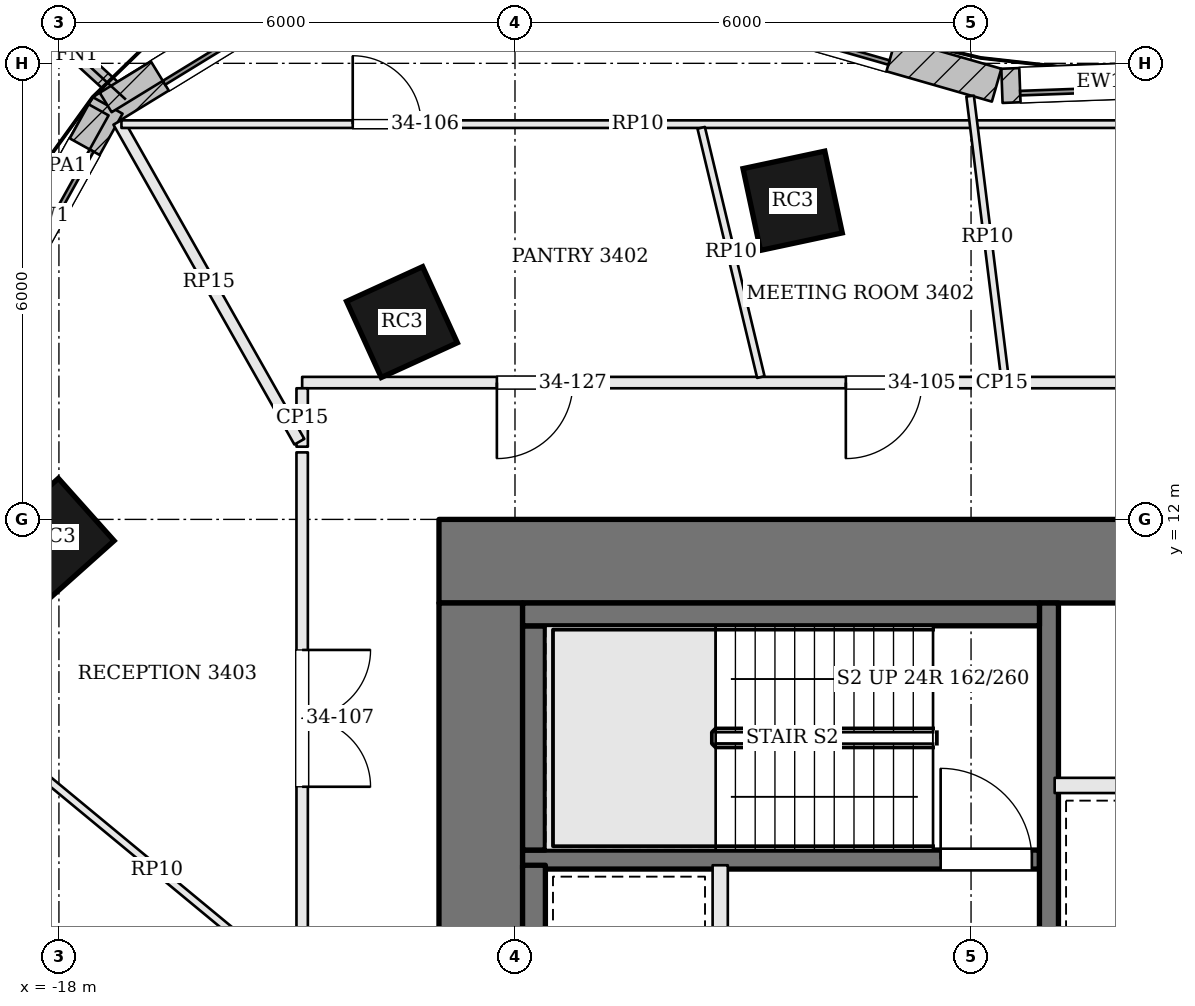
"""IFC4 building model, lengths in metres.
Left out: names, types, materials, properties, quantities, classifications, styles, units other than length and angle.
Written with IfcOpenShell. Run it as: python <this file> out.ifc"""

import sys

from ifc_helpers import new_model, si_unit, direction, frame, frame_2d, origin, origin_2d, place, context, subcontext, project, spatial, rectangle, extrude, element, fill, save


model = new_model("IFC4")
c1 = context("Model", 3, precision=1e-05, world=origin(), true_north=direction((0.0, 1.0)))
c2 = subcontext(c1, "Body", "Model", "MODEL_VIEW")
j1 = project(units=[si_unit("LENGTHUNIT", "METRE"), si_unit("PLANEANGLEUNIT", "RADIAN")], contexts=[c1])
p1 = place(None, origin())
s1 = spatial("IfcSite", under=j1, at=p1, CompositionType="ELEMENT")
p2 = place(p1, origin())
s2 = spatial("IfcBuilding", under=s1, at=p2, CompositionType="ELEMENT")
p3 = place(p2, frame((0.0, 0.0, 142.2)))
s3 = spatial("IfcBuildingStorey", under=s2, at=p3, CompositionType="ELEMENT", Elevation=142.2)
p4 = place(p3, frame((-13.0, 11.45, 0.0), z_axis=(0.0, 0.0, 1.0), x_axis=(1.0, 0.0, 0.0)))
e1 = element("IfcWall", 1, at=p4, inside=s3, PredefinedType="SHEAR", context=c2, shape_type="SweptSolid", body=[
    extrude(rectangle(XDim=26.0, YDim=1.1, at=frame_2d((13.0, 0.0))), origin(), (0.0, 0.0, 1.0), 3.9),
])
p5 = place(p4, frame((8.975, 0.0, 0.0)))
e2 = element("IfcOpeningElement", 2, at=p5, cuts=e1, PredefinedType="OPENING", context=c2, shape_type="SweptSolid", body=[
    extrude(rectangle(XDim=0.7, YDim=2.1, at=frame_2d((0.35, 1.05))), frame((0.0, 0.56, 0.0), z_axis=(0.0, -1.0, 0.0), x_axis=(1.0, 0.0, 0.0)), (0.0, 0.0, 1.0), 1.12),
])
p6 = place(p4, frame((11.425, 0.0, 0.0)))
e3 = element("IfcOpeningElement", 3, at=p6, cuts=e1, PredefinedType="OPENING", context=c2, shape_type="SweptSolid", body=[
    extrude(rectangle(XDim=0.7, YDim=2.1, at=frame_2d((0.35, 1.05))), frame((0.0, 0.56, 0.0), z_axis=(0.0, -1.0, 0.0), x_axis=(1.0, 0.0, 0.0)), (0.0, 0.0, 1.0), 1.12),
])
p7 = place(p4, frame((13.725, 0.0, 0.0)))
e4 = element("IfcOpeningElement", 4, at=p7, cuts=e1, PredefinedType="OPENING", context=c2, shape_type="SweptSolid", body=[
    extrude(rectangle(XDim=1.0, YDim=2.1, at=frame_2d((0.5, 1.05))), frame((0.0, 0.56, 0.0), z_axis=(0.0, -1.0, 0.0), x_axis=(1.0, 0.0, 0.0)), (0.0, 0.0, 1.0), 1.12),
])
p8 = place(p4, frame((16.175, 0.0, 0.0)))
e5 = element("IfcOpeningElement", 5, at=p8, cuts=e1, PredefinedType="OPENING", context=c2, shape_type="SweptSolid", body=[
    extrude(rectangle(XDim=1.0, YDim=2.1, at=frame_2d((0.5, 1.05))), frame((0.0, 0.56, 0.0), z_axis=(0.0, -1.0, 0.0), x_axis=(1.0, 0.0, 0.0)), (0.0, 0.0, 1.0), 1.12),
])
p9 = place(p3, frame((-12.45, -1.9, 0.0), z_axis=(0.0, 0.0, 1.0), x_axis=(0.0, 1.0, 0.0)))
e6 = element("IfcWall", 6, at=p9, inside=s3, PredefinedType="SHEAR", context=c2, shape_type="SweptSolid", body=[
    extrude(rectangle(XDim=12.8, YDim=1.1, at=frame_2d((6.4, 0.0))), origin(), (0.0, 0.0, 1.0), 3.9),
])
p10 = place(p9, frame((3.9, 0.0, 0.0)))
e7 = element("IfcOpeningElement", 7, at=p10, cuts=e6, PredefinedType="OPENING", context=c2, shape_type="SweptSolid", body=[
    extrude(rectangle(XDim=1.8, YDim=2.1, at=frame_2d((0.9, 1.05))), frame((0.0, 0.56, 0.0), z_axis=(0.0, -1.0, 0.0), x_axis=(1.0, 0.0, 0.0)), (0.0, 0.0, 1.0), 1.12),
])
for number, where, z_axis, x_axis in (
    (8, (-8.347, 16.192, 0.0), (0.0, 0.0, 1.0), (-0.978, -0.209, 0.0)),
    (9, (-13.487, 14.596, 0.0), (0.0, 0.0, 1.0), (-0.91, -0.415, 0.0)),
    (10, (-18.051, 11.763, 0.0), (0.0, 0.0, 1.0), (-0.746, -0.666, 0.0)),
):
    element("IfcColumn", number, at=place(p3, frame(where, z_axis=z_axis, x_axis=x_axis)), inside=s3, PredefinedType="COLUMN", context=c2, shape_type="SweptSolid", body=[
        extrude(rectangle(XDim=1.1, YDim=1.1, at=origin_2d()), origin(), (0.0, 0.0, 1.0), 3.9),
    ])
p11 = place(p3, frame((-3.022, 17.798, 0.0), z_axis=(0.0, 0.0, 1.0), x_axis=(-0.999339560591, -0.036337895349, 0.0)))
e11 = element("IfcWall", 11, at=p11, inside=s3, PredefinedType="SOLIDWALL", context=c2, shape_type="SweptSolid", body=[
    extrude(rectangle(XDim=2.573, YDim=0.45, at=frame_2d((1.287, 0.0))), origin(), (0.0, 0.0, 1.0), 3.7),
])
p12 = place(p11, frame((0.237, 0.0, 0.9)))
e12 = element("IfcOpeningElement", 12, at=p12, cuts=e11, PredefinedType="OPENING", context=c2, shape_type="SweptSolid", body=[
    extrude(rectangle(XDim=2.1, YDim=2.3, at=frame_2d((1.05, 1.15))), frame((0.0, 0.235, 0.0), z_axis=(0.0, -1.0, 0.0), x_axis=(1.0, 0.0, 0.0)), (0.0, 0.0, 1.0), 0.47),
])
p13 = place(p3, frame((-5.664, 17.713, 0.0), z_axis=(0.0, 0.0, 1.0), x_axis=(-0.961108031684, 0.276172684083, 0.0)))
e13 = element("IfcWall", 13, at=p13, inside=s3, PredefinedType="SOLIDWALL", context=c2, shape_type="SweptSolid", body=[
    extrude(rectangle(XDim=4.686, YDim=0.45, at=frame_2d((2.343, 0.0))), origin(), (0.0, 0.0, 1.0), 3.7),
])
p14 = place(p13, frame((1.443, 0.0, 0.9)))
e14 = element("IfcOpeningElement", 14, at=p14, cuts=e13, PredefinedType="OPENING", context=c2, shape_type="SweptSolid", body=[
    extrude(rectangle(XDim=1.8, YDim=2.3, at=frame_2d((0.9, 1.15))), frame((0.0, 0.235, 0.0), z_axis=(0.0, -1.0, 0.0), x_axis=(1.0, 0.0, 0.0)), (0.0, 0.0, 1.0), 0.47),
])
p15 = place(p3, frame((-14.116, 19.4, 0.0), z_axis=(0.0, 0.0, 1.0), x_axis=(-0.852622865325, -0.522526793117, 0.0)))
e15 = element("IfcWall", 15, at=p15, inside=s3, PredefinedType="SOLIDWALL", context=c2, shape_type="SweptSolid", body=[
    extrude(rectangle(XDim=3.896, YDim=0.45, at=frame_2d((1.948, 0.0))), origin(), (0.0, 0.0, 1.0), 3.7),
])
p16 = place(p15, frame((0.898, 0.0, 0.9)))
e16 = element("IfcOpeningElement", 16, at=p16, cuts=e15, PredefinedType="OPENING", context=c2, shape_type="SweptSolid", body=[
    extrude(rectangle(XDim=2.1, YDim=2.3, at=frame_2d((1.05, 1.15))), frame((0.0, 0.235, 0.0), z_axis=(0.0, -1.0, 0.0), x_axis=(1.0, 0.0, 0.0)), (0.0, 0.0, 1.0), 0.47),
])
p17 = place(p3, frame((-17.359, 17.447, 0.0), z_axis=(0.0, 0.0, 1.0), x_axis=(-0.485618126214, -0.874171056197, 0.0)))
e17 = element("IfcWall", 17, at=p17, inside=s3, PredefinedType="SOLIDWALL", context=c2, shape_type="SweptSolid", body=[
    extrude(rectangle(XDim=3.343, YDim=0.45, at=frame_2d((1.671, 0.0))), origin(), (0.0, 0.0, 1.0), 3.7),
])
p18 = place(p17, frame((0.621, 0.0, 0.9)))
e18 = element("IfcOpeningElement", 18, at=p18, cuts=e17, PredefinedType="OPENING", context=c2, shape_type="SweptSolid", body=[
    extrude(rectangle(XDim=2.1, YDim=2.3, at=frame_2d((1.05, 1.15))), frame((0.0, 0.235, 0.0), z_axis=(0.0, -1.0, 0.0), x_axis=(1.0, 0.0, 0.0)), (0.0, 0.0, 1.0), 0.47),
])
p19 = place(p3, frame((-17.119, 17.523, 0.0), z_axis=(0.0, 0.0, 1.0), x_axis=(-0.737866019047, 0.674947211221, 0.0)))
e19 = element("IfcWall", 19, at=p19, inside=s3, PredefinedType="SOLIDWALL", context=c2, shape_type="SweptSolid", body=[
    extrude(rectangle(XDim=1.75, YDim=0.2, at=frame_2d((0.875, 0.0))), origin(), (0.0, 0.0, 1.0), 3.7),
])
p20 = place(p3, frame((-14.266, 19.396, 3.9), z_axis=(0.0, 0.0, 1.0), x_axis=(-0.852626191256, -0.522521366055, 0.0)))
e20 = element("IfcWall", 20, at=p20, inside=s3, PredefinedType="PARAPET", context=c2, shape_type="SweptSolid", body=[
    extrude(rectangle(XDim=3.658, YDim=0.3, at=frame_2d((1.829, 0.0))), origin(), (0.0, 0.0, 1.0), 1.1),
])
p21 = place(p3, frame((-17.478, 17.388, 3.9), z_axis=(0.0, 0.0, 1.0), x_axis=(-0.485655243725, -0.874150435705, 0.0)))
e21 = element("IfcWall", 21, at=p21, inside=s3, PredefinedType="PARAPET", context=c2, shape_type="SweptSolid", body=[
    extrude(rectangle(XDim=1.684, YDim=0.3, at=frame_2d((0.842, 0.0))), origin(), (0.0, 0.0, 1.0), 1.1),
])
p22 = place(p3, frame((-11.9, 7.525, 0.0), z_axis=(0.0, 0.0, 1.0), x_axis=(1.0, 0.0, 0.0)))
e22 = element("IfcWall", 22, at=p22, inside=s3, PredefinedType="SOLIDWALL", context=c2, shape_type="SweptSolid", body=[
    extrude(rectangle(XDim=6.8, YDim=0.25, at=frame_2d((3.4, 0.0))), origin(), (0.0, 0.0, 1.0), 3.7),
])
p23 = place(p22, frame((5.5, 0.0, 0.0)))
e23 = element("IfcOpeningElement", 23, at=p23, cuts=e22, PredefinedType="OPENING", context=c2, shape_type="SweptSolid", body=[
    extrude(rectangle(XDim=1.2, YDim=2.1, at=frame_2d((0.6, 1.05))), frame((0.0, 0.135, 0.0), z_axis=(0.0, -1.0, 0.0), x_axis=(1.0, 0.0, 0.0)), (0.0, 0.0, 1.0), 0.27),
])
p24 = place(p3, frame((-9.3, 4.45, 0.0), z_axis=(0.0, 0.0, 1.0), x_axis=(0.0, 1.0, 0.0)))
e24 = element("IfcWall", 24, at=p24, inside=s3, PredefinedType="SOLIDWALL", context=c2, shape_type="SweptSolid", body=[
    extrude(rectangle(XDim=3.0, YDim=0.2, at=frame_2d((1.5, 0.0))), origin(), (0.0, 0.0, 1.0), 3.7),
])
p25 = place(p3, frame((-4.975, -1.9, 0.0), z_axis=(0.0, 0.0, 1.0), x_axis=(0.0, 1.0, 0.0)))
e25 = element("IfcWall", 25, at=p25, inside=s3, PredefinedType="SOLIDWALL", context=c2, shape_type="SweptSolid", body=[
    extrude(rectangle(XDim=12.8, YDim=0.25, at=frame_2d((6.4, 0.0))), origin(), (0.0, 0.0, 1.0), 3.7),
])
p26 = place(p25, frame((4.95, 0.0, 0.0)))
e26 = element("IfcOpeningElement", 26, at=p26, cuts=e25, PredefinedType="OPENING", context=c2, shape_type="SweptSolid", body=[
    extrude(rectangle(XDim=1.2, YDim=2.1, at=frame_2d((0.6, 1.05))), frame((0.0, 0.135, 0.0), z_axis=(0.0, -1.0, 0.0), x_axis=(1.0, 0.0, 0.0)), (0.0, 0.0, 1.0), 0.27),
])
p27 = place(p3, frame((-11.75, 4.45, 0.0), z_axis=(0.0, 0.0, 1.0), x_axis=(0.0, 1.0, 0.0)))
e27 = element("IfcWall", 27, at=p27, inside=s3, PredefinedType="SOLIDWALL", context=c2, shape_type="SweptSolid", body=[
    extrude(rectangle(XDim=3.0, YDim=0.3, at=frame_2d((1.5, 0.0))), origin(), (0.0, 0.0, 1.0), 3.7),
])
p28 = place(p3, frame((-11.75, 7.65, 0.0), z_axis=(0.0, 0.0, 1.0), x_axis=(0.0, 1.0, 0.0)))
e28 = element("IfcWall", 28, at=p28, inside=s3, PredefinedType="SOLIDWALL", context=c2, shape_type="SweptSolid", body=[
    extrude(rectangle(XDim=2.95, YDim=0.3, at=frame_2d((1.475, 0.0))), origin(), (0.0, 0.0, 1.0), 3.7),
])
p29 = place(p3, frame((-11.9, 10.75, 0.0), z_axis=(0.0, 0.0, 1.0), x_axis=(1.0, 0.0, 0.0)))
e29 = element("IfcWall", 29, at=p29, inside=s3, PredefinedType="SOLIDWALL", context=c2, shape_type="SweptSolid", body=[
    extrude(rectangle(XDim=6.8, YDim=0.3, at=frame_2d((3.4, 0.0))), origin(), (0.0, 0.0, 1.0), 3.7),
])
p30 = place(p3, frame((-4.9, 8.5, 0.0), z_axis=(0.0, 0.0, 1.0), x_axis=(1.0, 0.0, 0.0)))
e30 = element("IfcWall", 30, at=p30, inside=s3, PredefinedType="SOLIDWALL", context=c2, shape_type="SweptSolid", body=[
    extrude(rectangle(XDim=9.8, YDim=0.2, at=frame_2d((4.9, 0.0))), origin(), (0.0, 0.0, 1.0), 3.7),
])
p31 = place(p3, frame((3.012, 13.8, 0.0), z_axis=(0.0, 0.0, 1.0), x_axis=(-1.0, 0.0, 0.0)))
e31 = element("IfcWall", 31, at=p31, inside=s3, PredefinedType="PARTITIONING", context=c2, shape_type="SweptSolid", body=[
    extrude(rectangle(XDim=17.812, YDim=0.15, at=frame_2d((8.906, 0.0))), origin(), (0.0, 0.0, 1.0), 3.198),
])
p32 = place(p31, frame((3.342, 0.0, 0.0)))
e32 = element("IfcOpeningElement", 32, at=p32, cuts=e31, PredefinedType="OPENING", context=c2, shape_type="SweptSolid", body=[
    extrude(rectangle(XDim=1.8, YDim=2.1, at=frame_2d((0.9, 1.05))), frame((0.0, 0.085, 0.0), z_axis=(0.0, -1.0, 0.0), x_axis=(1.0, 0.0, 0.0)), (0.0, 0.0, 1.0), 0.17),
])
p33 = place(p31, frame((9.659, 0.0, 0.0)))
e33 = element("IfcOpeningElement", 33, at=p33, cuts=e31, PredefinedType="OPENING", context=c2, shape_type="SweptSolid", body=[
    extrude(rectangle(XDim=1.0, YDim=2.4, at=frame_2d((0.5, 1.2))), frame((0.0, 0.085, 0.0), z_axis=(0.0, -1.0, 0.0), x_axis=(1.0, 0.0, 0.0)), (0.0, 0.0, 1.0), 0.17),
])
p34 = place(p31, frame((14.25, 0.0, 0.0)))
e34 = element("IfcOpeningElement", 34, at=p34, cuts=e31, PredefinedType="OPENING", context=c2, shape_type="SweptSolid", body=[
    extrude(rectangle(XDim=1.0, YDim=2.1, at=frame_2d((0.5, 1.05))), frame((0.0, 0.085, 0.0), z_axis=(0.0, -1.0, 0.0), x_axis=(1.0, 0.0, 0.0)), (0.0, 0.0, 1.0), 0.17),
])
p35 = place(p3, frame((-14.8, 13.725, 0.0), z_axis=(0.0, 0.0, 1.0), x_axis=(0.0, -1.0, 0.0)))
e35 = element("IfcWall", 35, at=p35, inside=s3, PredefinedType="PARTITIONING", context=c2, shape_type="SweptSolid", body=[
    extrude(rectangle(XDim=0.769, YDim=0.15, at=frame_2d((0.384, 0.0))), origin(), (0.0, 0.0, 1.0), 3.198),
])
p36 = place(p3, frame((-17.218, 17.23, 0.0), z_axis=(0.0, 0.0, 1.0), x_axis=(0.492436580725, -0.870348329098, 0.0)))
e36 = element("IfcWall", 36, at=p36, inside=s3, PredefinedType="PARTITIONING", context=c2, shape_type="SweptSolid", body=[
    extrude(rectangle(XDim=4.835, YDim=0.15, at=frame_2d((2.417, 0.0))), origin(), (0.0, 0.0, 1.0), 3.198),
])
p37 = place(p3, frame((-14.8, 12.882, 0.0), z_axis=(0.0, 0.0, 1.0), x_axis=(0.0, -1.0, 0.0)))
e37 = element("IfcWall", 37, at=p37, inside=s3, PredefinedType="PARTITIONING", context=c2, shape_type="SweptSolid", body=[
    extrude(rectangle(XDim=16.652, YDim=0.15, at=frame_2d((8.326, 0.0))), origin(), (0.0, 0.0, 1.0), 3.198),
])
p38 = place(p37, frame((2.599, 0.0, 0.0)))
e38 = element("IfcOpeningElement", 38, at=p38, cuts=e37, PredefinedType="OPENING", context=c2, shape_type="SweptSolid", body=[
    extrude(rectangle(XDim=1.8, YDim=2.1, at=frame_2d((0.9, 1.05))), frame((0.0, 0.085, 0.0), z_axis=(0.0, -1.0, 0.0), x_axis=(1.0, 0.0, 0.0)), (0.0, 0.0, 1.0), 0.17),
])
p39 = place(p37, frame((9.456, 0.0, 0.0)))
e39 = element("IfcOpeningElement", 39, at=p39, cuts=e37, PredefinedType="OPENING", context=c2, shape_type="SweptSolid", body=[
    extrude(rectangle(XDim=1.0, YDim=2.4, at=frame_2d((0.5, 1.2))), frame((0.0, 0.085, 0.0), z_axis=(0.0, -1.0, 0.0), x_axis=(1.0, 0.0, 0.0)), (0.0, 0.0, 1.0), 0.17),
])
p40 = place(p37, frame((14.15, 0.0, 0.0)))
e40 = element("IfcOpeningElement", 40, at=p40, cuts=e37, PredefinedType="OPENING", context=c2, shape_type="SweptSolid", body=[
    extrude(rectangle(XDim=1.0, YDim=2.1, at=frame_2d((0.5, 1.05))), frame((0.0, 0.085, 0.0), z_axis=(0.0, -1.0, 0.0), x_axis=(1.0, 0.0, 0.0)), (0.0, 0.0, 1.0), 0.17),
])
p41 = place(p3, frame((-17.178, 17.2, 0.0), z_axis=(0.0, 0.0, 1.0), x_axis=(1.0, 0.0, 0.0)))
e41 = element("IfcWall", 41, at=p41, inside=s3, PredefinedType="PARTITIONING", context=c2, shape_type="SweptSolid", body=[
    extrude(rectangle(XDim=13.585, YDim=0.1, at=frame_2d((6.792, 0.0))), origin(), (0.0, 0.0, 1.0), 3.184),
])
p42 = place(p41, frame((3.043, 0.0, 0.0)))
e42 = element("IfcOpeningElement", 42, at=p42, cuts=e41, PredefinedType="OPENING", context=c2, shape_type="SweptSolid", body=[
    extrude(rectangle(XDim=0.9, YDim=2.1, at=frame_2d((0.45, 1.05))), frame((0.0, 0.06, 0.0), z_axis=(0.0, -1.0, 0.0), x_axis=(1.0, 0.0, 0.0)), (0.0, 0.0, 1.0), 0.12),
])
p43 = place(p3, frame((-5.556, 13.875, 0.0), z_axis=(0.0, 0.0, 1.0), x_axis=(-0.122573624649, 0.99245942312, 0.0)))
e43 = element("IfcWall", 43, at=p43, inside=s3, PredefinedType="PARTITIONING", context=c2, shape_type="SweptSolid", body=[
    extrude(rectangle(XDim=3.723, YDim=0.1, at=frame_2d((1.861, 0.0))), origin(), (0.0, 0.0, 1.0), 3.184),
])
p44 = place(p3, frame((-8.765, 13.873, 0.0), z_axis=(0.0, 0.0, 1.0), x_axis=(-0.232827854215, 0.972517963999, 0.0)))
e44 = element("IfcWall", 44, at=p44, inside=s3, PredefinedType="PARTITIONING", context=c2, shape_type="SweptSolid", body=[
    extrude(rectangle(XDim=3.371, YDim=0.1, at=frame_2d((1.686, 0.0))), origin(), (0.0, 0.0, 1.0), 3.184),
])
p45 = place(p3, frame((-14.858, 5.857, 0.0), z_axis=(0.0, 0.0, 1.0), x_axis=(-0.770605931108, 0.637311932213, 0.0)))
e45 = element("IfcWall", 45, at=p45, inside=s3, PredefinedType="PARTITIONING", context=c2, shape_type="SweptSolid", body=[
    extrude(rectangle(XDim=4.806, YDim=0.1, at=frame_2d((2.403, 0.0))), origin(), (0.0, 0.0, 1.0), 3.184),
])
p46 = place(p12, origin())
e46 = element("IfcWindow", 46, at=p46, inside=s3, PartitioningType="SINGLE_PANEL", PredefinedType="WINDOW", context=c2, shape_type="SweptSolid", body=[
    extrude(rectangle(XDim=2.1, YDim=2.3, at=frame_2d((1.05, 1.15))), frame((0.0, 0.135, 0.0), z_axis=(0.0, -1.0, 0.0), x_axis=(1.0, 0.0, 0.0)), (0.0, 0.0, 1.0), 0.06),
])
fill(e12, e46)
p47 = place(p14, origin())
e47 = element("IfcWindow", 47, at=p47, inside=s3, PartitioningType="SINGLE_PANEL", PredefinedType="WINDOW", context=c2, shape_type="SweptSolid", body=[
    extrude(rectangle(XDim=1.8, YDim=2.3, at=frame_2d((0.9, 1.15))), frame((0.0, 0.135, 0.0), z_axis=(0.0, -1.0, 0.0), x_axis=(1.0, 0.0, 0.0)), (0.0, 0.0, 1.0), 0.06),
])
fill(e14, e47)
p48 = place(p16, origin())
e48 = element("IfcWindow", 48, at=p48, inside=s3, PartitioningType="SINGLE_PANEL", PredefinedType="WINDOW", context=c2, shape_type="SweptSolid", body=[
    extrude(rectangle(XDim=2.1, YDim=2.3, at=frame_2d((1.05, 1.15))), frame((0.0, 0.135, 0.0), z_axis=(0.0, -1.0, 0.0), x_axis=(1.0, 0.0, 0.0)), (0.0, 0.0, 1.0), 0.06),
])
fill(e16, e48)
p49 = place(p18, origin())
e49 = element("IfcWindow", 49, at=p49, inside=s3, PartitioningType="SINGLE_PANEL", PredefinedType="WINDOW", context=c2, shape_type="SweptSolid", body=[
    extrude(rectangle(XDim=2.1, YDim=2.3, at=frame_2d((1.05, 1.15))), frame((0.0, 0.135, 0.0), z_axis=(0.0, -1.0, 0.0), x_axis=(1.0, 0.0, 0.0)), (0.0, 0.0, 1.0), 0.06),
])
fill(e18, e49)
p50 = place(p23, origin())
e50 = element("IfcDoor", 50, at=p50, inside=s3, OperationType="SINGLE_SWING_LEFT", PredefinedType="DOOR", context=c2, shape_type="SweptSolid", body=[
    extrude(rectangle(XDim=1.2, YDim=2.1, at=frame_2d((0.6, 1.05))), frame((0.0, 0.025, 0.0), z_axis=(0.0, -1.0, 0.0), x_axis=(1.0, 0.0, 0.0)), (0.0, 0.0, 1.0), 0.05),
])
fill(e23, e50)
p51 = place(p33, origin())
e51 = element("IfcDoor", 51, at=p51, inside=s3, OperationType="SINGLE_SWING_RIGHT", PredefinedType="DOOR", context=c2, shape_type="SweptSolid", body=[
    extrude(rectangle(XDim=1.0, YDim=2.4, at=frame_2d((0.5, 1.2))), frame((0.0, 0.025, 0.0), z_axis=(0.0, -1.0, 0.0), x_axis=(1.0, 0.0, 0.0)), (0.0, 0.0, 1.0), 0.05),
])
fill(e33, e51)
p52 = place(p42, origin())
e52 = element("IfcDoor", 52, at=p52, inside=s3, OperationType="SINGLE_SWING_LEFT", PredefinedType="DOOR", context=c2, shape_type="SweptSolid", body=[
    extrude(rectangle(XDim=0.9, YDim=2.1, at=frame_2d((0.45, 1.05))), frame((0.0, 0.025, 0.0), z_axis=(0.0, -1.0, 0.0), x_axis=(1.0, 0.0, 0.0)), (0.0, 0.0, 1.0), 0.05),
])
fill(e42, e52)
p53 = place(p38, origin())
e53 = element("IfcDoor", 53, at=p53, inside=s3, OperationType="DOUBLE_DOOR_SINGLE_SWING", PredefinedType="DOOR", context=c2, shape_type="SweptSolid", body=[
    extrude(rectangle(XDim=1.8, YDim=2.1, at=frame_2d((0.9, 1.05))), frame((0.0, 0.025, 0.0), z_axis=(0.0, -1.0, 0.0), x_axis=(1.0, 0.0, 0.0)), (0.0, 0.0, 1.0), 0.05),
])
fill(e38, e53)
p54 = place(p34, origin())
e54 = element("IfcDoor", 54, at=p54, inside=s3, OperationType="SINGLE_SWING_RIGHT", PredefinedType="DOOR", context=c2, shape_type="SweptSolid", body=[
    extrude(rectangle(XDim=1.0, YDim=2.1, at=frame_2d((0.5, 1.05))), frame((0.0, 0.025, 0.0), z_axis=(0.0, -1.0, 0.0), x_axis=(1.0, 0.0, 0.0)), (0.0, 0.0, 1.0), 0.05),
])
fill(e34, e54)
save(model, sys.argv[1])
